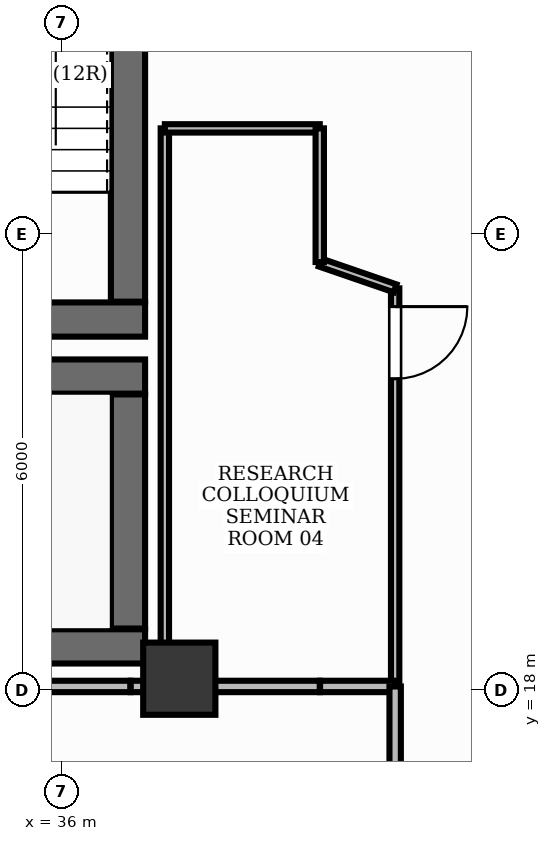
"""IFC4 building model, lengths in metres.
Left out: names, types, materials, properties, quantities, classifications, styles, units other than length and angle.
Written with IfcOpenShell. Run it as: python <this file> out.ifc"""

import sys

from ifc_helpers import new_model, si_unit, direction, frame, frame_2d, origin, origin_2d, place, context, subcontext, project, spatial, rectangle, extrude, element, fill, save


model = new_model("IFC4")
c1 = context("Model", 3, precision=1e-05, world=origin(), true_north=direction((0.0, 1.0)))
c2 = subcontext(c1, "Body", "Model", "MODEL_VIEW")
j1 = project(units=[si_unit("LENGTHUNIT", "METRE"), si_unit("PLANEANGLEUNIT", "RADIAN")], contexts=[c1])
p1 = place(None, origin())
s1 = spatial("IfcSite", under=j1, at=p1, CompositionType="ELEMENT")
p2 = place(p1, origin())
s2 = spatial("IfcBuilding", under=s1, at=p2, CompositionType="ELEMENT")
p3 = place(p2, frame((0.0, 0.0, 123.6)))
s3 = spatial("IfcBuildingStorey", under=s2, at=p3, CompositionType="ELEMENT", Elevation=123.6)
p4 = place(p3, frame((28.852, 18.575, 0.0), z_axis=(0.0, 0.0, 1.0), x_axis=(1.0, 0.0, 0.0)))
e1 = element("IfcWall", 1, at=p4, inside=s3, PredefinedType="SHEAR", context=c2, shape_type="SweptSolid", body=[
    extrude(rectangle(XDim=8.248, YDim=0.45, at=frame_2d((4.124, 0.0))), origin(), (0.0, 0.0, 1.0), 3.9),
])
p5 = place(p3, frame((28.35, 22.125, 0.0), z_axis=(0.0, 0.0, 1.0), x_axis=(1.0, 0.0, 0.0)))
e2 = element("IfcWall", 2, at=p5, inside=s3, PredefinedType="SHEAR", context=c2, shape_type="SweptSolid", body=[
    extrude(rectangle(XDim=8.75, YDim=0.45, at=frame_2d((4.375, 0.0))), origin(), (0.0, 0.0, 1.0), 3.9),
])
p6 = place(p3, frame((36.875, 18.81, 0.0), z_axis=(0.0, 0.0, 1.0), x_axis=(0.0, 1.0, 0.0)))
e3 = element("IfcWall", 3, at=p6, inside=s3, PredefinedType="SHEAR", context=c2, shape_type="SweptSolid", body=[
    extrude(rectangle(XDim=3.08, YDim=0.45, at=frame_2d((1.54, 0.0))), origin(), (0.0, 0.0, 1.0), 3.9),
])
p7 = place(p3, frame((33.1, 22.875, 0.0), z_axis=(0.0, 0.0, 1.0), x_axis=(1.0, 0.0, 0.0)))
e4 = element("IfcWall", 4, at=p7, inside=s3, PredefinedType="SHEAR", context=c2, shape_type="SweptSolid", body=[
    extrude(rectangle(XDim=4.0, YDim=0.45, at=frame_2d((2.0, 0.0))), origin(), (0.0, 0.0, 1.0), 3.9),
])
p8 = place(p3, frame((36.875, 23.11, 0.0), z_axis=(0.0, 0.0, 1.0), x_axis=(0.0, 1.0, 0.0)))
e5 = element("IfcWall", 5, at=p8, inside=s3, PredefinedType="SHEAR", context=c2, shape_type="SweptSolid", body=[
    extrude(rectangle(XDim=7.78, YDim=0.45, at=frame_2d((3.89, 0.0))), origin(), (0.0, 0.0, 1.0), 3.9),
])
p9 = place(p3, frame((37.55, 18.15, -0.0), z_axis=(0.0, 0.0, 1.0), x_axis=(1.0, 0.0, 0.0)))
e6 = element("IfcColumn", 6, at=p9, inside=s3, PredefinedType="PILASTER", context=c2, shape_type="SweptSolid", body=[
    extrude(rectangle(XDim=0.95, YDim=0.95, at=origin_2d()), origin(), (0.0, 0.0, 1.0), 3.901),
])
p10 = place(p3, frame((40.39, 23.285, 0.0), z_axis=(0.0, 0.0, 1.0), x_axis=(0.0, -1.0, 0.0)))
e7 = element("IfcWall", 7, at=p10, inside=s3, PredefinedType="MOVABLE", context=c2, shape_type="SweptSolid", body=[
    extrude(rectangle(XDim=5.227, YDim=0.11, at=frame_2d((2.614, 0.0))), origin(), (0.0, 0.0, 1.0), 2.91),
])
p11 = place(p10, frame((0.24, 0.0, 0.0)))
e8 = element("IfcOpeningElement", 8, at=p11, cuts=e7, PredefinedType="OPENING", context=c2, shape_type="SweptSolid", body=[
    extrude(rectangle(XDim=0.95, YDim=2.15, at=frame_2d((0.475, 1.075))), frame((0.0, 0.07, 0.0), z_axis=(0.0, -1.0, 0.0), x_axis=(1.0, 0.0, 0.0)), (0.0, 0.0, 1.0), 0.14),
])
p12 = place(p3, frame((29.0, 18.048, 0.0), z_axis=(0.0, 0.0, 1.0), x_axis=(1.0, 0.0, 0.0)))
e9 = element("IfcWall", 9, at=p12, inside=s3, PredefinedType="PARTITIONING", context=c2, shape_type="SweptSolid", body=[
    extrude(rectangle(XDim=7.906, YDim=0.15, at=frame_2d((3.953, 0.0))), origin(), (0.0, 0.0, 1.0), 2.91),
])
p13 = place(p3, frame((36.912, 18.048, 0.0), z_axis=(0.0, 0.0, 1.0), x_axis=(1.0, 0.0, 0.0)))
e10 = element("IfcWall", 10, at=p13, inside=s3, PredefinedType="PARTITIONING", context=c2, shape_type="SweptSolid", body=[
    extrude(rectangle(XDim=2.486, YDim=0.15, at=frame_2d((1.243, 0.0))), origin(), (0.0, 0.0, 1.0), 2.91),
])
p14 = place(p3, frame((39.402, 18.048, 0.0), z_axis=(0.0, 0.0, 1.0), x_axis=(1.0, 0.0, 0.0)))
e11 = element("IfcWall", 11, at=p14, inside=s3, PredefinedType="PARTITIONING", context=c2, shape_type="SweptSolid", body=[
    extrude(rectangle(XDim=0.988, YDim=0.15, at=frame_2d((0.494, 0.0))), origin(), (0.0, 0.0, 1.0), 2.91),
])
p15 = place(p3, frame((40.39, 18.048, 0.0), z_axis=(0.0, 0.0, 1.0), x_axis=(0.0, -1.0, 0.0)))
e12 = element("IfcWall", 12, at=p15, inside=s3, PredefinedType="PARTITIONING", context=c2, shape_type="SweptSolid", body=[
    extrude(rectangle(XDim=1.548, YDim=0.15, at=frame_2d((0.774, 0.0))), origin(), (0.0, 0.0, 1.0), 2.91),
])
p16 = place(p3, frame((39.402, 23.625, 0.0), z_axis=(0.0, 0.0, 1.0), x_axis=(0.945457381587, -0.325745820547, 0.0)))
e13 = element("IfcWall", 13, at=p16, inside=s3, PredefinedType="MOVABLE", context=c2, shape_type="SweptSolid", body=[
    extrude(rectangle(XDim=1.045, YDim=0.11, at=frame_2d((0.522, 0.0))), origin(), (0.0, 0.0, 1.0), 2.91),
])
p17 = place(p3, frame((37.36, 18.1, 0.0), z_axis=(0.0, 0.0, 1.0), x_axis=(0.0, 1.0, 0.0)))
e14 = element("IfcWall", 14, at=p17, inside=s3, PredefinedType="MOVABLE", context=c2, shape_type="SweptSolid", body=[
    extrude(rectangle(XDim=7.29, YDim=0.11, at=frame_2d((3.645, 0.0))), origin(), (0.0, 0.0, 1.0), 2.91),
])
p18 = place(p3, frame((37.36, 25.39, 0.0), z_axis=(0.0, 0.0, 1.0), x_axis=(1.0, 0.0, 0.0)))
e15 = element("IfcWall", 15, at=p18, inside=s3, PredefinedType="MOVABLE", context=c2, shape_type="SweptSolid", body=[
    extrude(rectangle(XDim=2.038, YDim=0.11, at=frame_2d((1.019, 0.0))), origin(), (0.0, 0.0, 1.0), 2.91),
])
p19 = place(p3, frame((39.398, 25.39, 0.0), z_axis=(0.0, 0.0, 1.0), x_axis=(0.0, -1.0, 0.0)))
e16 = element("IfcWall", 16, at=p19, inside=s3, PredefinedType="MOVABLE", context=c2, shape_type="SweptSolid", body=[
    extrude(rectangle(XDim=1.759, YDim=0.11, at=frame_2d((0.879, 0.0))), origin(), (0.0, 0.0, 1.0), 2.91),
])
p20 = place(p11, origin())
e17 = element("IfcDoor", 17, at=p20, inside=s3, OperationType="SINGLE_SWING_LEFT", PredefinedType="DOOR", context=c2, shape_type="SweptSolid", body=[
    extrude(rectangle(XDim=0.95, YDim=2.15, at=frame_2d((0.475, 1.075))), frame((0.0, 0.025, 0.0), z_axis=(0.0, -1.0, 0.0), x_axis=(1.0, 0.0, 0.0)), (0.0, 0.0, 1.0), 0.05),
])
fill(e8, e17)
save(model, sys.argv[1])
